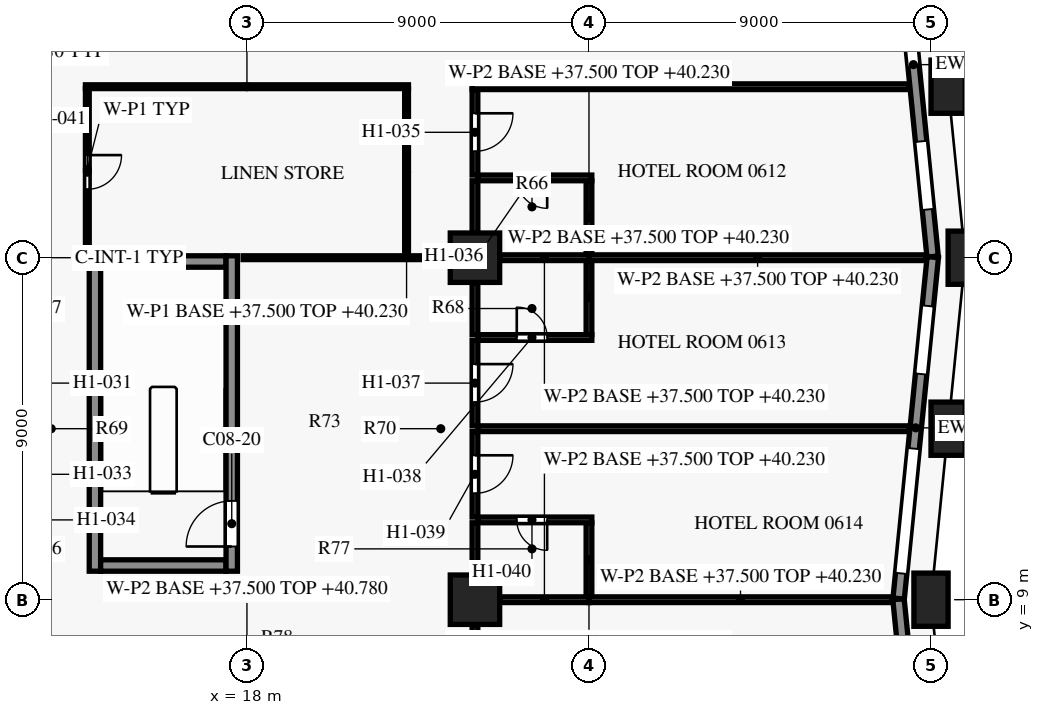
"""IFC4 building model, lengths in metres.
Left out: names, types, materials, properties, quantities, classifications, styles, units other than length and angle.
Written with IfcOpenShell. Run it as: python <this file> out.ifc"""

import sys

from ifc_helpers import new_model, si_unit, direction, frame, frame_2d, origin, origin_2d, place, context, subcontext, project, spatial, rectangle, extrude, element, fill, save


model = new_model("IFC4")
c1 = context("Model", 3, precision=1e-05, world=origin(), true_north=direction((0.0, 1.0)))
c2 = subcontext(c1, "Body", "Model", "MODEL_VIEW")
j1 = project(units=[si_unit("LENGTHUNIT", "METRE"), si_unit("PLANEANGLEUNIT", "RADIAN")], contexts=[c1])
p1 = place(None, origin())
s1 = spatial("IfcSite", under=j1, at=p1, CompositionType="ELEMENT")
p2 = place(p1, origin())
s2 = spatial("IfcBuilding", under=s1, at=p2, CompositionType="ELEMENT")
p3 = place(p2, frame((0.0, 0.0, 37.5)))
s3 = spatial("IfcBuildingStorey", under=s2, at=p3, CompositionType="ELEMENT", Elevation=37.5)
for number, where, z_axis, x_axis in (
    (1, (36.0, 9.0, 0.0), (0.0, 0.0, 1.0), (0.0, 1.0, 0.0)),
    (2, (36.45, 13.5, 0.0), (0.0, 0.0, 1.0), (0.1, 0.995, 0.0)),
    (3, (36.9, 18.0, 0.0), (0.0, 0.0, 1.0), (0.0, 1.0, 0.0)),
    (4, (36.45, 22.5, 0.0), (0.0, 0.0, 1.0), (-0.1, 0.995, 0.0)),
):
    element("IfcColumn", number, at=place(p3, frame(where, z_axis=z_axis, x_axis=x_axis)), inside=s3, PredefinedType="COLUMN", context=c2, shape_type="SweptSolid", body=[
        extrude(rectangle(XDim=0.9, YDim=1.4, at=origin_2d()), origin(), (0.0, 0.0, 1.0), 3.6),
    ])
for number, where, z_axis, x_axis in (
    (5, (24.0, 9.0, 0.0), (0.0, 0.0, 1.0), (1.0, 0.0, 0.0)),
    (6, (24.0, 18.0, 0.0), (0.0, 0.0, 1.0), (1.0, 0.0, 0.0)),
):
    element("IfcColumn", number, at=place(p3, frame(where, z_axis=z_axis, x_axis=x_axis)), inside=s3, PredefinedType="COLUMN", context=c2, shape_type="SweptSolid", body=[
        extrude(rectangle(XDim=1.3, YDim=1.3, at=origin_2d()), origin(), (0.0, 0.0, 1.0), 3.6),
    ])
p4 = place(p3, frame((35.144, 9.015, 0.0), z_axis=(0.0, 0.0, 1.0), x_axis=(0.099462600847, -0.995041301169, 0.0)))
e7 = element("IfcWall", 7, at=p4, inside=s3, PredefinedType="SOLIDWALL", context=c2, shape_type="SweptSolid", body=[
    extrude(rectangle(XDim=3.527, YDim=0.3, at=frame_2d((1.764, 0.0))), origin(), (0.0, 0.0, 1.0), 2.95),
])
p5 = place(p3, frame((36.047, 18.015, 0.0), z_axis=(0.0, 0.0, 1.0), x_axis=(-0.099522457379, -0.995035316196, 0.0)))
e8 = element("IfcWall", 8, at=p5, inside=s3, PredefinedType="SOLIDWALL", context=c2, shape_type="SweptSolid", body=[
    extrude(rectangle(XDim=9.03, YDim=0.3, at=frame_2d((4.515, 0.0))), origin(), (0.0, 0.0, 1.0), 2.95),
])
p6 = place(p5, frame((1.291, 0.0, 0.75)))
e9 = element("IfcOpeningElement", 9, at=p6, cuts=e8, PredefinedType="OPENING", context=c2, shape_type="SweptSolid", body=[
    extrude(rectangle(XDim=1.8, YDim=1.8, at=frame_2d((0.9, 0.9))), frame((0.0, 0.16, 0.0), z_axis=(0.0, -1.0, 0.0), x_axis=(1.0, 0.0, 0.0)), (0.0, 0.0, 1.0), 0.32),
])
p7 = place(p5, frame((5.064, 0.0, 0.15)))
e10 = element("IfcOpeningElement", 10, at=p7, cuts=e8, PredefinedType="OPENING", context=c2, shape_type="SweptSolid", body=[
    extrude(rectangle(XDim=3.3, YDim=2.4, at=frame_2d((1.65, 1.2))), frame((0.0, 0.16, 0.0), z_axis=(0.0, -1.0, 0.0), x_axis=(1.0, 0.0, 0.0)), (0.0, 0.0, 1.0), 0.32),
])
p8 = place(p3, frame((35.033, 28.132, 0.0), z_axis=(0.0, 0.0, 1.0), x_axis=(0.099487051997, -0.995038856771, 0.0)))
e11 = element("IfcWall", 11, at=p8, inside=s3, PredefinedType="SOLIDWALL", context=c2, shape_type="SweptSolid", body=[
    extrude(rectangle(XDim=10.152, YDim=0.3, at=frame_2d((5.076, 0.0))), origin(), (0.0, 0.0, 1.0), 2.95),
])
p9 = place(p8, frame((1.833, 0.0, 0.15)))
e12 = element("IfcOpeningElement", 12, at=p9, cuts=e11, PredefinedType="OPENING", context=c2, shape_type="SweptSolid", body=[
    extrude(rectangle(XDim=3.3, YDim=2.4, at=frame_2d((1.65, 1.2))), frame((0.0, 0.16, 0.0), z_axis=(0.0, -1.0, 0.0), x_axis=(1.0, 0.0, 0.0)), (0.0, 0.0, 1.0), 0.32),
])
p10 = place(p8, frame((7.106, 0.0, 0.75)))
e13 = element("IfcOpeningElement", 13, at=p10, cuts=e11, PredefinedType="OPENING", context=c2, shape_type="SweptSolid", body=[
    extrude(rectangle(XDim=1.8, YDim=1.8, at=frame_2d((0.9, 0.9))), frame((0.0, 0.16, 0.0), z_axis=(0.0, -1.0, 0.0), x_axis=(1.0, 0.0, 0.0)), (0.0, 0.0, 1.0), 0.32),
])
for number, where, z_axis, x_axis in (
    (14, (14.15, 9.9, 0.0), (0.0, 0.0, 1.0), (1.0, 0.0, 0.0)),
    (15, (14.15, 17.9, 0.0), (0.0, 0.0, 1.0), (1.0, 0.0, 0.0)),
):
    element("IfcWall", number, at=place(p3, frame(where, z_axis=z_axis, x_axis=x_axis)), inside=s3, PredefinedType="SHEAR", context=c2, shape_type="SweptSolid", body=[
        extrude(rectangle(XDim=3.3, YDim=0.3, at=frame_2d((1.65, 0.0))), origin(), (0.0, 0.0, 1.0), 3.3),
    ])
p11 = place(p3, frame((14.0, 9.75, 0.0), z_axis=(0.0, 0.0, 1.0), x_axis=(0.0, 1.0, 0.0)))
e16 = element("IfcWall", 16, at=p11, inside=s3, PredefinedType="SHEAR", context=c2, shape_type="SweptSolid", body=[
    extrude(rectangle(XDim=8.3, YDim=0.3, at=frame_2d((4.15, 0.0))), origin(), (0.0, 0.0, 1.0), 3.3),
])
p12 = place(p3, frame((17.6, 9.75, 0.0), z_axis=(0.0, 0.0, 1.0), x_axis=(0.0, 1.0, 0.0)))
e17 = element("IfcWall", 17, at=p12, inside=s3, PredefinedType="SHEAR", context=c2, shape_type="SweptSolid", body=[
    extrude(rectangle(XDim=8.3, YDim=0.3, at=frame_2d((4.15, 0.0))), origin(), (0.0, 0.0, 1.0), 3.3),
])
p13 = place(p12, frame((0.65, 0.0, 0.0)))
e18 = element("IfcOpeningElement", 18, at=p13, cuts=e17, PredefinedType="OPENING", context=c2, shape_type="SweptSolid", body=[
    extrude(rectangle(XDim=1.2, YDim=2.2, at=frame_2d((0.6, 1.1))), frame((0.0, 0.16, 0.0), z_axis=(0.0, -1.0, 0.0), x_axis=(1.0, 0.0, 0.0)), (0.0, 0.0, 1.0), 0.32),
])
p14 = place(p3, frame((24.0, 8.345, 0.0), z_axis=(0.0, 0.0, 1.0), x_axis=(0.0, -1.0, 0.0)))
e19 = element("IfcWall", 19, at=p14, inside=s3, PredefinedType="PARTITIONING", context=c2, shape_type="SweptSolid", body=[
    extrude(rectangle(XDim=1.07, YDim=0.15, at=frame_2d((0.535, 0.0))), origin(), (0.0, 0.0, 1.0), 2.58),
])
p15 = place(p3, frame((27.0, 9.0, 0.0), z_axis=(0.0, 0.0, 1.0), x_axis=(-1.0, 0.0, 0.0)))
e20 = element("IfcWall", 20, at=p15, inside=s3, PredefinedType="PARTITIONING", context=c2, shape_type="SweptSolid", body=[
    extrude(rectangle(XDim=2.345, YDim=0.15, at=frame_2d((1.172, 0.0))), origin(), (0.0, 0.0, 1.0), 2.73),
])
p16 = place(p3, frame((34.975, 9.0, 0.0), z_axis=(0.0, 0.0, 1.0), x_axis=(-1.0, 0.0, 0.0)))
e21 = element("IfcWall", 21, at=p16, inside=s3, PredefinedType="PARTITIONING", context=c2, shape_type="SweptSolid", body=[
    extrude(rectangle(XDim=7.975, YDim=0.15, at=frame_2d((3.988, 0.0))), origin(), (0.0, 0.0, 1.0), 2.73),
])
p17 = place(p3, frame((27.0, 9.075, 0.0), z_axis=(0.0, 0.0, 1.0), x_axis=(0.0, 1.0, 0.0)))
e22 = element("IfcWall", 22, at=p17, inside=s3, PredefinedType="PARTITIONING", context=c2, shape_type="SweptSolid", body=[
    extrude(rectangle(XDim=1.95, YDim=0.15, at=frame_2d((0.975, 0.0))), origin(), (0.0, 0.0, 1.0), 2.73),
])
p18 = place(p3, frame((24.0, 11.025, 0.0), z_axis=(0.0, 0.0, 1.0), x_axis=(0.0, -1.0, 0.0)))
e23 = element("IfcWall", 23, at=p18, inside=s3, PredefinedType="PARTITIONING", context=c2, shape_type="SweptSolid", body=[
    extrude(rectangle(XDim=1.37, YDim=0.15, at=frame_2d((0.685, 0.0))), origin(), (0.0, 0.0, 1.0), 2.58),
])
p19 = place(p3, frame((27.075, 11.1, 0.0), z_axis=(0.0, 0.0, 1.0), x_axis=(-1.0, 0.0, 0.0)))
e24 = element("IfcWall", 24, at=p19, inside=s3, PredefinedType="PARTITIONING", context=c2, shape_type="SweptSolid", body=[
    extrude(rectangle(XDim=3.0, YDim=0.15, at=frame_2d((1.5, 0.0))), origin(), (0.0, 0.0, 1.0), 2.58),
])
p20 = place(p19, frame((1.175, 0.0, 0.0)))
e25 = element("IfcOpeningElement", 25, at=p20, cuts=e24, PredefinedType="OPENING", context=c2, shape_type="SweptSolid", body=[
    extrude(rectangle(XDim=0.8, YDim=2.1, at=frame_2d((0.4, 1.05))), frame((0.0, 0.085, 0.0), z_axis=(0.0, -1.0, 0.0), x_axis=(1.0, 0.0, 0.0)), (0.0, 0.0, 1.0), 0.17),
])
p21 = place(p3, frame((24.0, 13.425, 0.0), z_axis=(0.0, 0.0, 1.0), x_axis=(0.0, -1.0, 0.0)))
e26 = element("IfcWall", 26, at=p21, inside=s3, PredefinedType="PARTITIONING", context=c2, shape_type="SweptSolid", body=[
    extrude(rectangle(XDim=2.25, YDim=0.15, at=frame_2d((1.125, 0.0))), origin(), (0.0, 0.0, 1.0), 2.58),
])
p22 = place(p21, frame((0.625, 0.0, 0.0)))
e27 = element("IfcOpeningElement", 27, at=p22, cuts=e26, PredefinedType="OPENING", context=c2, shape_type="SweptSolid", body=[
    extrude(rectangle(XDim=1.0, YDim=2.1, at=frame_2d((0.5, 1.05))), frame((0.0, 0.085, 0.0), z_axis=(0.0, -1.0, 0.0), x_axis=(1.0, 0.0, 0.0)), (0.0, 0.0, 1.0), 0.17),
])
p23 = place(p3, frame((35.425, 13.5, 0.0), z_axis=(0.0, 0.0, 1.0), x_axis=(-1.0, 0.0, 0.0)))
e28 = element("IfcWall", 28, at=p23, inside=s3, PredefinedType="PARTITIONING", context=c2, shape_type="SweptSolid", body=[
    extrude(rectangle(XDim=11.35, YDim=0.15, at=frame_2d((5.675, 0.0))), origin(), (0.0, 0.0, 1.0), 2.58),
])
p24 = place(p3, frame((24.0, 15.825, 0.0), z_axis=(0.0, 0.0, 1.0), x_axis=(0.0, -1.0, 0.0)))
e29 = element("IfcWall", 29, at=p24, inside=s3, PredefinedType="PARTITIONING", context=c2, shape_type="SweptSolid", body=[
    extrude(rectangle(XDim=2.25, YDim=0.15, at=frame_2d((1.125, 0.0))), origin(), (0.0, 0.0, 1.0), 2.58),
])
p25 = place(p24, frame((0.625, 0.0, 0.0)))
e30 = element("IfcOpeningElement", 30, at=p25, cuts=e29, PredefinedType="OPENING", context=c2, shape_type="SweptSolid", body=[
    extrude(rectangle(XDim=1.0, YDim=2.1, at=frame_2d((0.5, 1.05))), frame((0.0, 0.085, 0.0), z_axis=(0.0, -1.0, 0.0), x_axis=(1.0, 0.0, 0.0)), (0.0, 0.0, 1.0), 0.17),
])
p26 = place(p3, frame((24.075, 15.9, 0.0), z_axis=(0.0, 0.0, 1.0), x_axis=(1.0, 0.0, 0.0)))
e31 = element("IfcWall", 31, at=p26, inside=s3, PredefinedType="PARTITIONING", context=c2, shape_type="SweptSolid", body=[
    extrude(rectangle(XDim=3.0, YDim=0.15, at=frame_2d((1.5, 0.0))), origin(), (0.0, 0.0, 1.0), 2.58),
])
p27 = place(p26, frame((1.025, 0.0, 0.0)))
e32 = element("IfcOpeningElement", 32, at=p27, cuts=e31, PredefinedType="OPENING", context=c2, shape_type="SweptSolid", body=[
    extrude(rectangle(XDim=0.8, YDim=2.1, at=frame_2d((0.4, 1.05))), frame((0.0, 0.085, 0.0), z_axis=(0.0, -1.0, 0.0), x_axis=(1.0, 0.0, 0.0)), (0.0, 0.0, 1.0), 0.17),
])
p28 = place(p3, frame((27.0, 15.975, 0.0), z_axis=(0.0, 0.0, 1.0), x_axis=(0.0, 1.0, 0.0)))
e33 = element("IfcWall", 33, at=p28, inside=s3, PredefinedType="PARTITIONING", context=c2, shape_type="SweptSolid", body=[
    extrude(rectangle(XDim=1.95, YDim=0.15, at=frame_2d((0.975, 0.0))), origin(), (0.0, 0.0, 1.0), 2.73),
])
p29 = place(p3, frame((24.0, 17.345, 0.0), z_axis=(0.0, 0.0, 1.0), x_axis=(0.0, -1.0, 0.0)))
e34 = element("IfcWall", 34, at=p29, inside=s3, PredefinedType="PARTITIONING", context=c2, shape_type="SweptSolid", body=[
    extrude(rectangle(XDim=1.37, YDim=0.15, at=frame_2d((0.685, 0.0))), origin(), (0.0, 0.0, 1.0), 2.58),
])
p30 = place(p3, frame((23.33, 18.0, 0.0), z_axis=(0.0, 0.0, 1.0), x_axis=(-1.0, 0.0, 0.0)))
e35 = element("IfcWall", 35, at=p30, inside=s3, PredefinedType="PARTITIONING", context=c2, shape_type="SweptSolid", body=[
    extrude(rectangle(XDim=5.43, YDim=0.1, at=frame_2d((2.715, 0.0))), origin(), (0.0, 0.0, 1.0), 2.73),
])
p31 = place(p3, frame((27.0, 18.0, 0.0), z_axis=(0.0, 0.0, 1.0), x_axis=(-1.0, 0.0, 0.0)))
e36 = element("IfcWall", 36, at=p31, inside=s3, PredefinedType="PARTITIONING", context=c2, shape_type="SweptSolid", body=[
    extrude(rectangle(XDim=2.345, YDim=0.15, at=frame_2d((1.172, 0.0))), origin(), (0.0, 0.0, 1.0), 2.73),
])
p32 = place(p3, frame((35.875, 18.0, 0.0), z_axis=(0.0, 0.0, 1.0), x_axis=(-1.0, 0.0, 0.0)))
e37 = element("IfcWall", 37, at=p32, inside=s3, PredefinedType="PARTITIONING", context=c2, shape_type="SweptSolid", body=[
    extrude(rectangle(XDim=8.875, YDim=0.15, at=frame_2d((4.438, 0.0))), origin(), (0.0, 0.0, 1.0), 2.73),
])
p33 = place(p3, frame((22.2, 18.05, 0.0), z_axis=(0.0, 0.0, 1.0), x_axis=(0.0, 1.0, 0.0)))
e38 = element("IfcWall", 38, at=p33, inside=s3, PredefinedType="PARTITIONING", context=c2, shape_type="SweptSolid", body=[
    extrude(rectangle(XDim=4.4, YDim=0.1, at=frame_2d((2.2, 0.0))), origin(), (0.0, 0.0, 1.0), 2.73),
])
p34 = place(p3, frame((27.0, 18.075, 0.0), z_axis=(0.0, 0.0, 1.0), x_axis=(0.0, 1.0, 0.0)))
e39 = element("IfcWall", 39, at=p34, inside=s3, PredefinedType="PARTITIONING", context=c2, shape_type="SweptSolid", body=[
    extrude(rectangle(XDim=1.95, YDim=0.15, at=frame_2d((0.975, 0.0))), origin(), (0.0, 0.0, 1.0), 2.73),
])
p35 = place(p3, frame((24.0, 20.025, 0.0), z_axis=(0.0, 0.0, 1.0), x_axis=(0.0, -1.0, 0.0)))
e40 = element("IfcWall", 40, at=p35, inside=s3, PredefinedType="PARTITIONING", context=c2, shape_type="SweptSolid", body=[
    extrude(rectangle(XDim=1.37, YDim=0.15, at=frame_2d((0.685, 0.0))), origin(), (0.0, 0.0, 1.0), 2.58),
])
p36 = place(p3, frame((27.075, 20.1, 0.0), z_axis=(0.0, 0.0, 1.0), x_axis=(-1.0, 0.0, 0.0)))
e41 = element("IfcWall", 41, at=p36, inside=s3, PredefinedType="PARTITIONING", context=c2, shape_type="SweptSolid", body=[
    extrude(rectangle(XDim=3.0, YDim=0.15, at=frame_2d((1.5, 0.0))), origin(), (0.0, 0.0, 1.0), 2.58),
])
p37 = place(p36, frame((1.175, 0.0, 0.0)))
e42 = element("IfcOpeningElement", 42, at=p37, cuts=e41, PredefinedType="OPENING", context=c2, shape_type="SweptSolid", body=[
    extrude(rectangle(XDim=0.8, YDim=2.1, at=frame_2d((0.4, 1.05))), frame((0.0, 0.085, 0.0), z_axis=(0.0, -1.0, 0.0), x_axis=(1.0, 0.0, 0.0)), (0.0, 0.0, 1.0), 0.17),
])
p38 = place(p3, frame((24.0, 22.425, 0.0), z_axis=(0.0, 0.0, 1.0), x_axis=(0.0, -1.0, 0.0)))
e43 = element("IfcWall", 43, at=p38, inside=s3, PredefinedType="PARTITIONING", context=c2, shape_type="SweptSolid", body=[
    extrude(rectangle(XDim=2.25, YDim=0.15, at=frame_2d((1.125, 0.0))), origin(), (0.0, 0.0, 1.0), 2.58),
])
p39 = place(p38, frame((0.625, 0.0, 0.0)))
e44 = element("IfcOpeningElement", 44, at=p39, cuts=e43, PredefinedType="OPENING", context=c2, shape_type="SweptSolid", body=[
    extrude(rectangle(XDim=1.0, YDim=2.1, at=frame_2d((0.5, 1.05))), frame((0.0, 0.085, 0.0), z_axis=(0.0, -1.0, 0.0), x_axis=(1.0, 0.0, 0.0)), (0.0, 0.0, 1.0), 0.17),
])
p40 = place(p3, frame((13.8, 22.45, 0.0), z_axis=(0.0, 0.0, 1.0), x_axis=(0.0, -1.0, 0.0)))
e45 = element("IfcWall", 45, at=p40, inside=s3, PredefinedType="PARTITIONING", context=c2, shape_type="SweptSolid", body=[
    extrude(rectangle(XDim=4.25, YDim=0.1, at=frame_2d((2.125, 0.0))), origin(), (0.0, 0.0, 1.0), 3.28),
])
p41 = place(p40, frame((1.75, 0.0, 0.0)))
e46 = element("IfcOpeningElement", 46, at=p41, cuts=e45, PredefinedType="OPENING", context=c2, shape_type="SweptSolid", body=[
    extrude(rectangle(XDim=0.9, YDim=2.1, at=frame_2d((0.45, 1.05))), frame((0.0, 0.06, 0.0), z_axis=(0.0, -1.0, 0.0), x_axis=(1.0, 0.0, 0.0)), (0.0, 0.0, 1.0), 0.12),
])
p42 = place(p3, frame((22.25, 22.5, 0.0), z_axis=(0.0, 0.0, 1.0), x_axis=(-1.0, 0.0, 0.0)))
e47 = element("IfcWall", 47, at=p42, inside=s3, PredefinedType="PARTITIONING", context=c2, shape_type="SweptSolid", body=[
    extrude(rectangle(XDim=8.5, YDim=0.1, at=frame_2d((4.25, 0.0))), origin(), (0.0, 0.0, 1.0), 2.58),
])
p43 = place(p3, frame((35.425, 22.5, 0.0), z_axis=(0.0, 0.0, 1.0), x_axis=(-1.0, 0.0, 0.0)))
e48 = element("IfcWall", 48, at=p43, inside=s3, PredefinedType="PARTITIONING", context=c2, shape_type="SweptSolid", body=[
    extrude(rectangle(XDim=11.5, YDim=0.15, at=frame_2d((5.75, 0.0))), origin(), (0.0, 0.0, 1.0), 2.58),
])
p44 = place(p6, origin())
e49 = element("IfcWindow", 49, at=p44, inside=s3, PartitioningType="SINGLE_PANEL", PredefinedType="WINDOW", context=c2, shape_type="SweptSolid", body=[
    extrude(rectangle(XDim=1.8, YDim=1.8, at=frame_2d((0.9, 0.9))), frame((0.0, 0.03, 0.0), z_axis=(0.0, -1.0, 0.0), x_axis=(1.0, 0.0, 0.0)), (0.0, 0.0, 1.0), 0.06),
])
fill(e9, e49)
p45 = place(p7, origin())
e50 = element("IfcWindow", 50, at=p45, inside=s3, PartitioningType="SINGLE_PANEL", PredefinedType="WINDOW", context=c2, shape_type="SweptSolid", body=[
    extrude(rectangle(XDim=3.3, YDim=2.4, at=frame_2d((1.65, 1.2))), frame((0.0, 0.03, 0.0), z_axis=(0.0, -1.0, 0.0), x_axis=(1.0, 0.0, 0.0)), (0.0, 0.0, 1.0), 0.06),
])
fill(e10, e50)
p46 = place(p9, origin())
e51 = element("IfcWindow", 51, at=p46, inside=s3, PartitioningType="SINGLE_PANEL", PredefinedType="WINDOW", context=c2, shape_type="SweptSolid", body=[
    extrude(rectangle(XDim=3.3, YDim=2.4, at=frame_2d((1.65, 1.2))), frame((0.0, 0.03, 0.0), z_axis=(0.0, -1.0, 0.0), x_axis=(1.0, 0.0, 0.0)), (0.0, 0.0, 1.0), 0.06),
])
fill(e12, e51)
p47 = place(p10, origin())
e52 = element("IfcWindow", 52, at=p47, inside=s3, PartitioningType="SINGLE_PANEL", PredefinedType="WINDOW", context=c2, shape_type="SweptSolid", body=[
    extrude(rectangle(XDim=1.8, YDim=1.8, at=frame_2d((0.9, 0.9))), frame((0.0, 0.03, 0.0), z_axis=(0.0, -1.0, 0.0), x_axis=(1.0, 0.0, 0.0)), (0.0, 0.0, 1.0), 0.06),
])
fill(e13, e52)
p48 = place(p13, origin())
e53 = element("IfcDoor", 53, at=p48, inside=s3, OperationType="SINGLE_SWING_LEFT", PredefinedType="DOOR", context=c2, shape_type="SweptSolid", body=[
    extrude(rectangle(XDim=1.2, YDim=2.2, at=frame_2d((0.6, 1.1))), frame((0.0, 0.025, 0.0), z_axis=(0.0, -1.0, 0.0), x_axis=(1.0, 0.0, 0.0)), (0.0, 0.0, 1.0), 0.05),
])
fill(e18, e53)
p49 = place(p39, origin())
e54 = element("IfcDoor", 54, at=p49, inside=s3, OperationType="SINGLE_SWING_LEFT", PredefinedType="DOOR", context=c2, shape_type="SweptSolid", body=[
    extrude(rectangle(XDim=1.0, YDim=2.1, at=frame_2d((0.5, 1.05))), frame((0.0, 0.025, 0.0), z_axis=(0.0, -1.0, 0.0), x_axis=(1.0, 0.0, 0.0)), (0.0, 0.0, 1.0), 0.05),
])
fill(e44, e54)
p50 = place(p37, origin())
e55 = element("IfcDoor", 55, at=p50, inside=s3, OperationType="SINGLE_SWING_LEFT", PredefinedType="DOOR", context=c2, shape_type="SweptSolid", body=[
    extrude(rectangle(XDim=0.8, YDim=2.1, at=frame_2d((0.4, 1.05))), frame((0.0, 0.025, 0.0), z_axis=(0.0, -1.0, 0.0), x_axis=(1.0, 0.0, 0.0)), (0.0, 0.0, 1.0), 0.05),
])
fill(e42, e55)
p51 = place(p25, origin())
e56 = element("IfcDoor", 56, at=p51, inside=s3, OperationType="SINGLE_SWING_LEFT", PredefinedType="DOOR", context=c2, shape_type="SweptSolid", body=[
    extrude(rectangle(XDim=1.0, YDim=2.1, at=frame_2d((0.5, 1.05))), frame((0.0, 0.025, 0.0), z_axis=(0.0, -1.0, 0.0), x_axis=(1.0, 0.0, 0.0)), (0.0, 0.0, 1.0), 0.05),
])
fill(e30, e56)
p52 = place(p27, origin())
e57 = element("IfcDoor", 57, at=p52, inside=s3, OperationType="SINGLE_SWING_LEFT", PredefinedType="DOOR", context=c2, shape_type="SweptSolid", body=[
    extrude(rectangle(XDim=0.8, YDim=2.1, at=frame_2d((0.4, 1.05))), frame((0.0, 0.025, 0.0), z_axis=(0.0, -1.0, 0.0), x_axis=(1.0, 0.0, 0.0)), (0.0, 0.0, 1.0), 0.05),
])
fill(e32, e57)
p53 = place(p22, origin())
e58 = element("IfcDoor", 58, at=p53, inside=s3, OperationType="SINGLE_SWING_LEFT", PredefinedType="DOOR", context=c2, shape_type="SweptSolid", body=[
    extrude(rectangle(XDim=1.0, YDim=2.1, at=frame_2d((0.5, 1.05))), frame((0.0, 0.025, 0.0), z_axis=(0.0, -1.0, 0.0), x_axis=(1.0, 0.0, 0.0)), (0.0, 0.0, 1.0), 0.05),
])
fill(e27, e58)
p54 = place(p20, origin())
e59 = element("IfcDoor", 59, at=p54, inside=s3, OperationType="SINGLE_SWING_LEFT", PredefinedType="DOOR", context=c2, shape_type="SweptSolid", body=[
    extrude(rectangle(XDim=0.8, YDim=2.1, at=frame_2d((0.4, 1.05))), frame((0.0, 0.025, 0.0), z_axis=(0.0, -1.0, 0.0), x_axis=(1.0, 0.0, 0.0)), (0.0, 0.0, 1.0), 0.05),
])
fill(e25, e59)
p55 = place(p41, origin())
e60 = element("IfcDoor", 60, at=p55, inside=s3, OperationType="SINGLE_SWING_LEFT", PredefinedType="DOOR", context=c2, shape_type="SweptSolid", body=[
    extrude(rectangle(XDim=0.9, YDim=2.1, at=frame_2d((0.45, 1.05))), frame((0.0, 0.025, 0.0), z_axis=(0.0, -1.0, 0.0), x_axis=(1.0, 0.0, 0.0)), (0.0, 0.0, 1.0), 0.05),
])
fill(e46, e60)
save(model, sys.argv[1])
